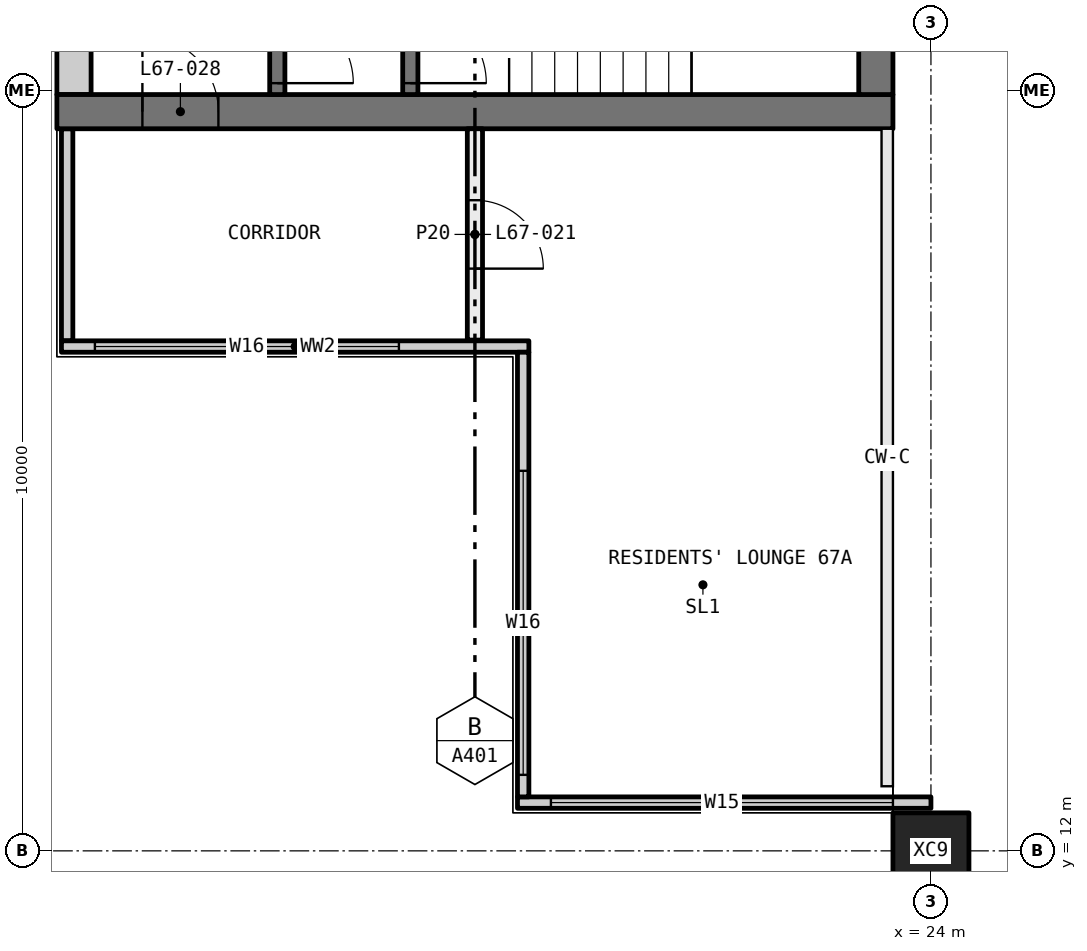
"""IFC4 building model, lengths in metres.
Left out: names, types, materials, properties, quantities, classifications, styles, units other than length and angle.
Written with IfcOpenShell. Run it as: python <this file> out.ifc"""

import sys

from ifc_helpers import new_model, si_unit, direction, frame, frame_2d, origin, origin_2d, place, context, subcontext, project, spatial, rectangle, hollow_rectangle, extrude, element, fill, save


model = new_model("IFC4")
c1 = context("Model", 3, precision=1e-05, world=origin(), true_north=direction((0.0, 1.0)))
c2 = subcontext(c1, "Body", "Model", "MODEL_VIEW")
j1 = project(units=[si_unit("LENGTHUNIT", "METRE"), si_unit("PLANEANGLEUNIT", "RADIAN")], contexts=[c1])
p1 = place(None, origin())
s1 = spatial("IfcSite", under=j1, at=p1, CompositionType="ELEMENT")
p2 = place(p1, origin())
s2 = spatial("IfcBuilding", under=s1, at=p2, CompositionType="ELEMENT")
p3 = place(p2, frame((0.0, 0.0, 249.0)))
s3 = spatial("IfcBuildingStorey", under=s2, at=p3, CompositionType="ELEMENT", Elevation=249.0)
p4 = place(p3, frame((24.0, 12.0, -0.4), z_axis=(0.0, 0.0, 1.0), x_axis=(1.0, 0.0, 0.0)))
e1 = element("IfcColumn", 1, at=p4, inside=s3, PredefinedType="COLUMN", context=c2, shape_type="SweptSolid", body=[
    extrude(hollow_rectangle(XDim=1.0, YDim=1.0, WallThickness=0.036, at=origin_2d()), origin(), (0.0, 0.0, 1.0), 3.45),
])
p5 = place(p3, frame((18.56, 12.635, 0.0), z_axis=(0.0, 0.0, 1.0), x_axis=(1.0, 0.0, 0.0)))
e2 = element("IfcWall", 2, at=p5, inside=s3, PredefinedType="ELEMENTEDWALL", context=c2, shape_type="SweptSolid", body=[
    extrude(rectangle(XDim=5.44, YDim=0.15, at=frame_2d((2.72, 0.0))), origin(), (0.0, 0.0, 1.0), 3.05),
])
p6 = place(p5, frame((0.44, 0.0, 0.45)))
e3 = element("IfcOpeningElement", 3, at=p6, cuts=e2, PredefinedType="OPENING", context=c2, shape_type="SweptSolid", body=[
    extrude(rectangle(XDim=4.5, YDim=2.55, at=frame_2d((2.25, 1.275))), frame((0.0, 0.085, 0.0), z_axis=(0.0, -1.0, 0.0), x_axis=(1.0, 0.0, 0.0)), (0.0, 0.0, 1.0), 0.17),
])
p7 = place(p3, frame((12.635, 18.71, 0.0), z_axis=(0.0, 0.0, 1.0), x_axis=(0.0, 1.0, 0.0)))
e4 = element("IfcWall", 4, at=p7, inside=s3, PredefinedType="ELEMENTEDWALL", context=c2, shape_type="SweptSolid", body=[
    extrude(rectangle(XDim=2.79, YDim=0.15, at=frame_2d((1.395, 0.0))), origin(), (0.0, 0.0, 1.0), 3.05),
])
p8 = place(p3, frame((12.56, 18.635, 0.0), z_axis=(0.0, 0.0, 1.0), x_axis=(1.0, 0.0, 0.0)))
e5 = element("IfcWall", 5, at=p8, inside=s3, PredefinedType="ELEMENTEDWALL", context=c2, shape_type="SweptSolid", body=[
    extrude(rectangle(XDim=6.15, YDim=0.15, at=frame_2d((3.075, 0.0))), origin(), (0.0, 0.0, 1.0), 3.05),
])
p9 = place(p8, frame((0.44, 0.0, 0.45)))
e6 = element("IfcOpeningElement", 6, at=p9, cuts=e5, PredefinedType="OPENING", context=c2, shape_type="SweptSolid", body=[
    extrude(rectangle(XDim=4.0, YDim=2.55, at=frame_2d((2.0, 1.275))), frame((0.0, 0.085, 0.0), z_axis=(0.0, -1.0, 0.0), x_axis=(1.0, 0.0, 0.0)), (0.0, 0.0, 1.0), 0.17),
])
p10 = place(p3, frame((18.635, 12.71, 0.0), z_axis=(0.0, 0.0, 1.0), x_axis=(0.0, 1.0, 0.0)))
e7 = element("IfcWall", 7, at=p10, inside=s3, PredefinedType="ELEMENTEDWALL", context=c2, shape_type="SweptSolid", body=[
    extrude(rectangle(XDim=5.85, YDim=0.15, at=frame_2d((2.925, 0.0))), origin(), (0.0, 0.0, 1.0), 3.05),
])
p11 = place(p10, frame((0.29, 0.0, 0.45)))
e8 = element("IfcOpeningElement", 8, at=p11, cuts=e7, PredefinedType="OPENING", context=c2, shape_type="SweptSolid", body=[
    extrude(rectangle(XDim=4.0, YDim=2.55, at=frame_2d((2.0, 1.275))), frame((0.0, 0.085, 0.0), z_axis=(0.0, -1.0, 0.0), x_axis=(1.0, 0.0, 0.0)), (0.0, 0.0, 1.0), 0.17),
])
p12 = place(p3, frame((18.0, 21.5, 0.0), z_axis=(0.0, 0.0, 1.0), x_axis=(0.0, -1.0, 0.0)))
e9 = element("IfcWall", 9, at=p12, inside=s3, PredefinedType="PARTITIONING", context=c2, shape_type="SweptSolid", body=[
    extrude(rectangle(XDim=2.78, YDim=0.2, at=frame_2d((1.39, 0.0))), origin(), (0.0, 0.0, 1.0), 3.05),
])
p13 = place(p12, frame((0.94, 0.0, 0.0)))
e10 = element("IfcOpeningElement", 10, at=p13, cuts=e9, PredefinedType="OPENING", context=c2, shape_type="SweptSolid", body=[
    extrude(rectangle(XDim=0.9, YDim=2.1, at=frame_2d((0.45, 1.05))), frame((0.0, 0.11, 0.0), z_axis=(0.0, -1.0, 0.0), x_axis=(1.0, 0.0, 0.0)), (0.0, 0.0, 1.0), 0.22),
])
p14 = place(p3, frame((12.5, 21.725, 0.0), z_axis=(0.0, 0.0, 1.0), x_axis=(1.0, 0.0, 0.0)))
e11 = element("IfcWall", 11, at=p14, inside=s3, PredefinedType="SHEAR", context=c2, shape_type="SweptSolid", body=[
    extrude(rectangle(XDim=11.0, YDim=0.45, at=frame_2d((5.5, 0.0))), origin(), (0.0, 0.0, 1.0), 3.05),
])
p15 = place(p14, frame((1.125, 0.0, 0.0)))
e12 = element("IfcOpeningElement", 12, at=p15, cuts=e11, PredefinedType="OPENING", context=c2, shape_type="SweptSolid", body=[
    extrude(rectangle(XDim=1.0, YDim=2.1, at=frame_2d((0.5, 1.05))), frame((0.0, 0.235, 0.0), z_axis=(0.0, -1.0, 0.0), x_axis=(1.0, 0.0, 0.0)), (0.0, 0.0, 1.0), 0.47),
])
p16 = place(p3, frame((12.725, 21.95, 0.0), z_axis=(0.0, 0.0, 1.0), x_axis=(0.0, 1.0, 0.0)))
e13 = element("IfcWall", 13, at=p16, inside=s3, PredefinedType="SHEAR", context=c2, shape_type="SweptSolid", body=[
    extrude(rectangle(XDim=16.1, YDim=0.45, at=frame_2d((8.05, 0.0))), origin(), (0.0, 0.0, 1.0), 3.05),
])
p17 = place(p3, frame((23.275, 21.95, 0.0), z_axis=(0.0, 0.0, 1.0), x_axis=(0.0, 1.0, 0.0)))
e14 = element("IfcWall", 14, at=p17, inside=s3, PredefinedType="SHEAR", context=c2, shape_type="SweptSolid", body=[
    extrude(rectangle(XDim=16.1, YDim=0.45, at=frame_2d((8.05, 0.0))), origin(), (0.0, 0.0, 1.0), 3.05),
])
p18 = place(p17, frame((7.25, 0.0, 0.0)))
e15 = element("IfcOpeningElement", 15, at=p18, cuts=e14, PredefinedType="OPENING", context=c2, shape_type="SweptSolid", body=[
    extrude(rectangle(XDim=1.6, YDim=2.1, at=frame_2d((0.8, 1.05))), frame((0.0, 0.235, 0.0), z_axis=(0.0, -1.0, 0.0), x_axis=(1.0, 0.0, 0.0)), (0.0, 0.0, 1.0), 0.47),
])
p19 = place(p3, frame((15.4, 21.95, 0.0), z_axis=(0.0, 0.0, 1.0), x_axis=(0.0, 1.0, 0.0)))
e16 = element("IfcWall", 16, at=p19, inside=s3, PredefinedType="SOLIDWALL", context=c2, shape_type="SweptSolid", body=[
    extrude(rectangle(XDim=12.95, YDim=0.2, at=frame_2d((6.475, 0.0))), origin(), (0.0, 0.0, 1.0), 3.05),
])
p20 = place(p19, frame((3.75, 0.0, 0.0)))
e17 = element("IfcOpeningElement", 17, at=p20, cuts=e16, PredefinedType="OPENING", context=c2, shape_type="SweptSolid", body=[
    extrude(rectangle(XDim=1.1, YDim=2.1, at=frame_2d((0.55, 1.05))), frame((0.0, 0.11, 0.0), z_axis=(0.0, -1.0, 0.0), x_axis=(1.0, 0.0, 0.0)), (0.0, 0.0, 1.0), 0.22),
])
p21 = place(p19, frame((0.15, 0.0, 0.0)))
e18 = element("IfcOpeningElement", 18, at=p21, cuts=e16, PredefinedType="OPENING", context=c2, shape_type="SweptSolid", body=[
    extrude(rectangle(XDim=1.0, YDim=2.1, at=frame_2d((0.5, 1.05))), frame((0.0, 0.11, 0.0), z_axis=(0.0, -1.0, 0.0), x_axis=(1.0, 0.0, 0.0)), (0.0, 0.0, 1.0), 0.22),
])
p22 = place(p19, frame((7.025, 0.0, 0.0)))
e19 = element("IfcOpeningElement", 19, at=p22, cuts=e16, PredefinedType="OPENING", context=c2, shape_type="SweptSolid", body=[
    extrude(rectangle(XDim=0.9, YDim=2.1, at=frame_2d((0.45, 1.05))), frame((0.0, 0.11, 0.0), z_axis=(0.0, -1.0, 0.0), x_axis=(1.0, 0.0, 0.0)), (0.0, 0.0, 1.0), 0.22),
])
p23 = place(p19, frame((10.675, 0.0, 0.0)))
e20 = element("IfcOpeningElement", 20, at=p23, cuts=e16, PredefinedType="OPENING", context=c2, shape_type="SweptSolid", body=[
    extrude(rectangle(XDim=0.9, YDim=2.1, at=frame_2d((0.45, 1.05))), frame((0.0, 0.11, 0.0), z_axis=(0.0, -1.0, 0.0), x_axis=(1.0, 0.0, 0.0)), (0.0, 0.0, 1.0), 0.22),
])
p24 = place(p3, frame((17.15, 21.95, 0.0), z_axis=(0.0, 0.0, 1.0), x_axis=(0.0, 1.0, 0.0)))
e21 = element("IfcWall", 21, at=p24, inside=s3, PredefinedType="SOLIDWALL", context=c2, shape_type="SweptSolid", body=[
    extrude(rectangle(XDim=2.95, YDim=0.2, at=frame_2d((1.475, 0.0))), origin(), (0.0, 0.0, 1.0), 3.05),
])
p25 = place(p24, frame((0.15, 0.0, 0.0)))
e22 = element("IfcOpeningElement", 22, at=p25, cuts=e21, PredefinedType="OPENING", context=c2, shape_type="SweptSolid", body=[
    extrude(rectangle(XDim=1.0, YDim=2.1, at=frame_2d((0.5, 1.05))), frame((0.0, 0.11, 0.0), z_axis=(0.0, -1.0, 0.0), x_axis=(1.0, 0.0, 0.0)), (0.0, 0.0, 1.0), 0.22),
])
p26 = place(p6, origin())
e23 = element("IfcWindow", 23, at=p26, inside=s3, PartitioningType="SINGLE_PANEL", PredefinedType="WINDOW", context=c2, shape_type="SweptSolid", body=[
    extrude(rectangle(XDim=4.5, YDim=2.55, at=frame_2d((2.25, 1.275))), frame((0.0, 0.03, 0.0), z_axis=(0.0, -1.0, 0.0), x_axis=(1.0, 0.0, 0.0)), (0.0, 0.0, 1.0), 0.06),
])
fill(e3, e23)
p27 = place(p9, origin())
e24 = element("IfcWindow", 24, at=p27, inside=s3, PartitioningType="SINGLE_PANEL", PredefinedType="WINDOW", context=c2, shape_type="SweptSolid", body=[
    extrude(rectangle(XDim=4.0, YDim=2.55, at=frame_2d((2.0, 1.275))), frame((0.0, 0.03, 0.0), z_axis=(0.0, -1.0, 0.0), x_axis=(1.0, 0.0, 0.0)), (0.0, 0.0, 1.0), 0.06),
])
fill(e6, e24)
p28 = place(p11, origin())
e25 = element("IfcWindow", 25, at=p28, inside=s3, PartitioningType="SINGLE_PANEL", PredefinedType="WINDOW", context=c2, shape_type="SweptSolid", body=[
    extrude(rectangle(XDim=4.0, YDim=2.55, at=frame_2d((2.0, 1.275))), frame((0.0, 0.03, 0.0), z_axis=(0.0, -1.0, 0.0), x_axis=(1.0, 0.0, 0.0)), (0.0, 0.0, 1.0), 0.06),
])
fill(e8, e25)
p29 = place(p13, origin())
e26 = element("IfcDoor", 26, at=p29, inside=s3, OperationType="SINGLE_SWING_LEFT", PredefinedType="DOOR", context=c2, shape_type="SweptSolid", body=[
    extrude(rectangle(XDim=0.9, YDim=2.1, at=frame_2d((0.45, 1.05))), frame((0.0, 0.025, 0.0), z_axis=(0.0, -1.0, 0.0), x_axis=(1.0, 0.0, 0.0)), (0.0, 0.0, 1.0), 0.05),
])
fill(e10, e26)
p30 = place(p25, frame((1.0, 0.0, 0.0), x_axis=(-1.0, 0.0, 0.0)))
e27 = element("IfcDoor", 27, at=p30, inside=s3, OperationType="SINGLE_SWING_LEFT", PredefinedType="DOOR", context=c2, shape_type="SweptSolid", body=[
    extrude(rectangle(XDim=1.0, YDim=2.1, at=frame_2d((0.5, 1.05))), frame((0.0, 0.025, 0.0), z_axis=(0.0, -1.0, 0.0), x_axis=(1.0, 0.0, 0.0)), (0.0, 0.0, 1.0), 0.05),
])
fill(e22, e27)
p31 = place(p21, frame((1.0, 0.0, 0.0), x_axis=(-1.0, 0.0, 0.0)))
e28 = element("IfcDoor", 28, at=p31, inside=s3, OperationType="SINGLE_SWING_LEFT", PredefinedType="DOOR", context=c2, shape_type="SweptSolid", body=[
    extrude(rectangle(XDim=1.0, YDim=2.1, at=frame_2d((0.5, 1.05))), frame((0.0, 0.025, 0.0), z_axis=(0.0, -1.0, 0.0), x_axis=(1.0, 0.0, 0.0)), (0.0, 0.0, 1.0), 0.05),
])
fill(e18, e28)
p32 = place(p15, origin())
e29 = element("IfcDoor", 29, at=p32, inside=s3, OperationType="SINGLE_SWING_RIGHT", PredefinedType="DOOR", context=c2, shape_type="SweptSolid", body=[
    extrude(rectangle(XDim=1.0, YDim=2.1, at=frame_2d((0.5, 1.05))), frame((0.0, 0.025, 0.0), z_axis=(0.0, -1.0, 0.0), x_axis=(1.0, 0.0, 0.0)), (0.0, 0.0, 1.0), 0.05),
])
fill(e12, e29)
save(model, sys.argv[1])
